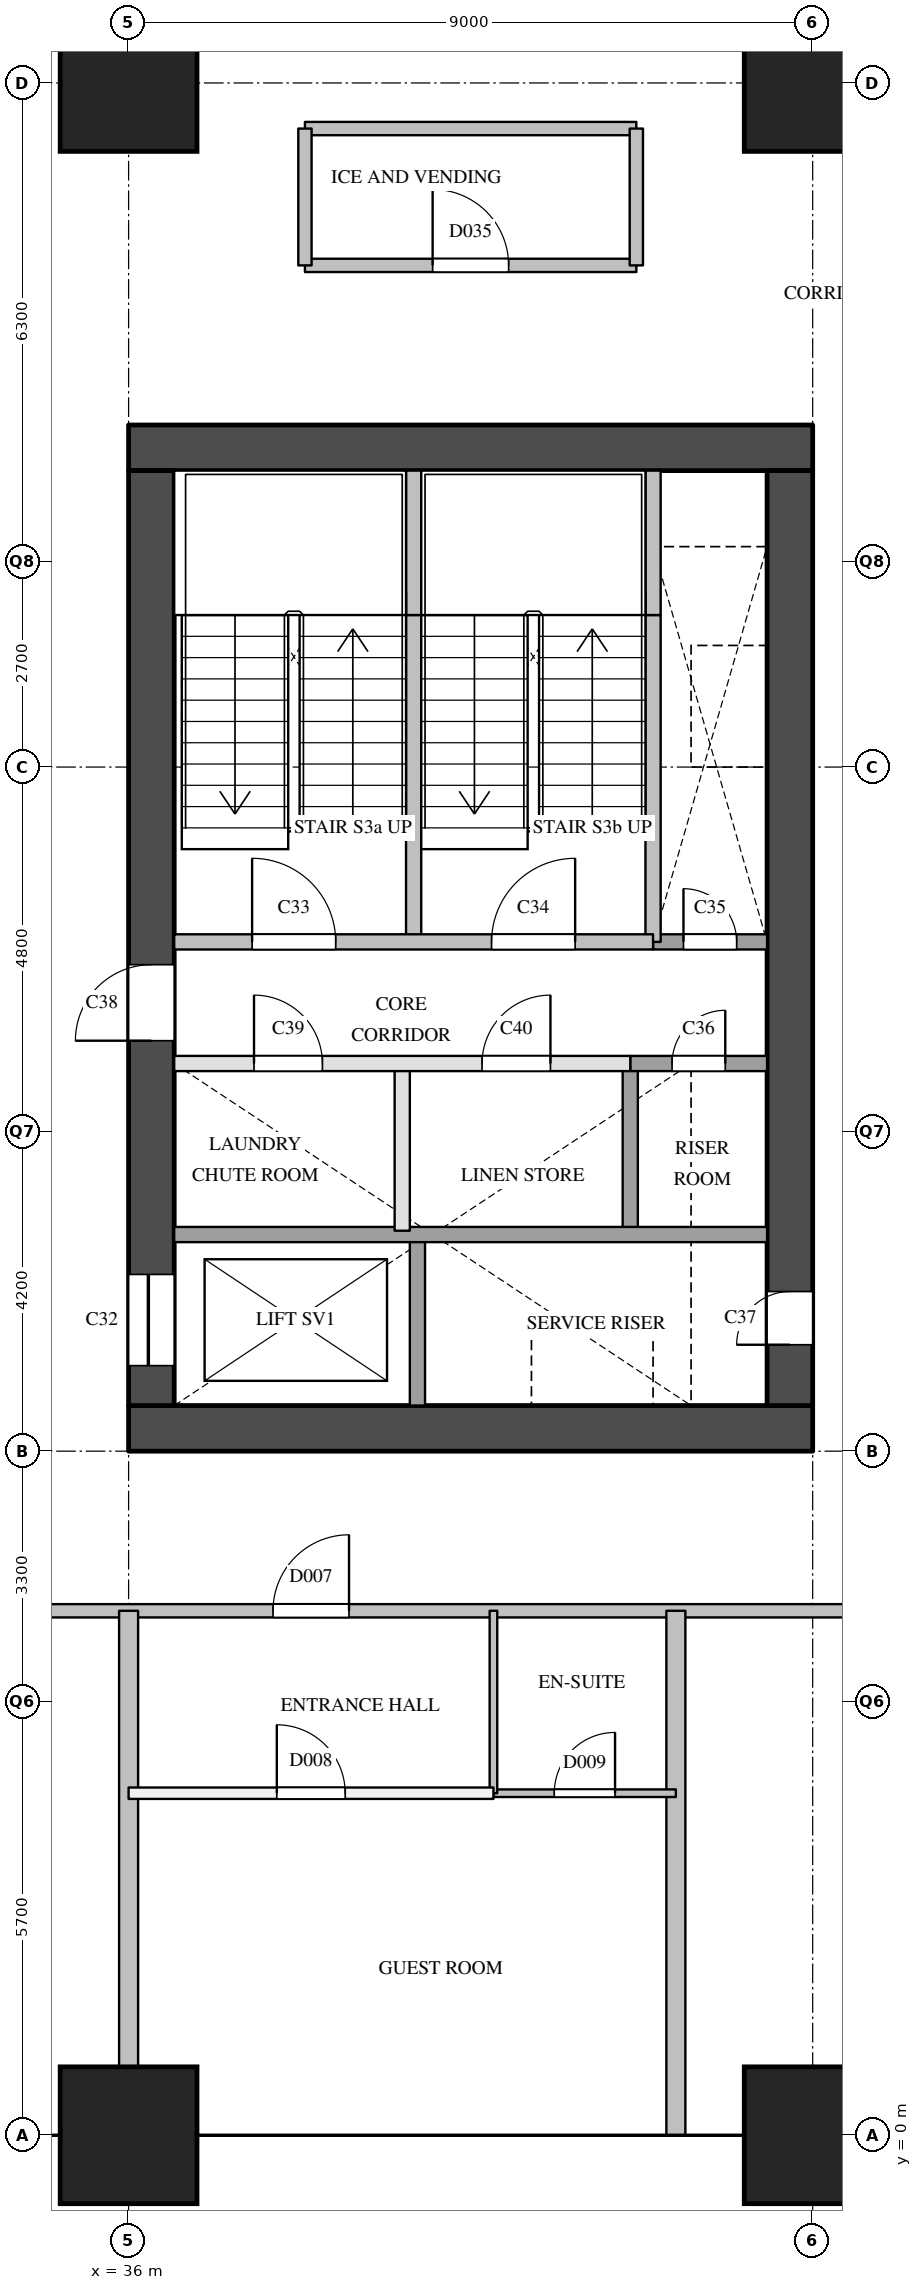
"""IFC4 building model, lengths in metres.
Left out: names, types, materials, properties, quantities, classifications, styles, units other than length and angle.
Written with IfcOpenShell. Run it as: python <this file> out.ifc"""

import sys

from ifc_helpers import new_model, si_unit, direction, frame, frame_2d, origin, origin_2d, place, context, subcontext, project, spatial, rectangle, extrude, element, fill, save


model = new_model("IFC4")
c1 = context("Model", 3, precision=1e-05, world=origin(), true_north=direction((0.0, 1.0)))
c2 = subcontext(c1, "Body", "Model", "MODEL_VIEW")
j1 = project(units=[si_unit("LENGTHUNIT", "METRE"), si_unit("PLANEANGLEUNIT", "RADIAN")], contexts=[c1])
p1 = place(None, origin())
s1 = spatial("IfcSite", under=j1, at=p1, CompositionType="ELEMENT")
p2 = place(p1, origin())
s2 = spatial("IfcBuilding", under=s1, at=p2, CompositionType="ELEMENT")
p3 = place(p2, frame((0.0, 0.0, 69.0)))
s3 = spatial("IfcBuildingStorey", under=s2, at=p3, CompositionType="ELEMENT", Elevation=69.0)
for number, where, z_axis, x_axis in (
    (1, (36.0, 0.0, 0.0), (0.0, 0.0, 1.0), (1.0, 0.0, 0.0)),
    (2, (36.0, 27.0, 0.0), (0.0, 0.0, 1.0), (1.0, 0.0, 0.0)),
    (3, (45.0, 0.0, 0.0), (0.0, 0.0, 1.0), (1.0, 0.0, 0.0)),
    (4, (45.0, 27.0, 0.0), (0.0, 0.0, 1.0), (1.0, 0.0, 0.0)),
):
    element("IfcColumn", number, at=place(p3, frame(where, z_axis=z_axis, x_axis=x_axis)), inside=s3, PredefinedType="COLUMN", context=c2, shape_type="SweptSolid", body=[
        extrude(rectangle(XDim=1.8, YDim=1.8, at=origin_2d()), origin(), (0.0, 0.0, 1.0), 3.8),
    ])
for number, where, z_axis, x_axis in (
    (5, (36.0, 9.3, 0.0), (0.0, 0.0, 1.0), (1.0, 0.0, 0.0)),
    (6, (36.0, 22.2, 0.0), (0.0, 0.0, 1.0), (1.0, 0.0, 0.0)),
):
    element("IfcWall", number, at=place(p3, frame(where, z_axis=z_axis, x_axis=x_axis)), inside=s3, PredefinedType="SHEAR", context=c2, shape_type="SweptSolid", body=[
        extrude(rectangle(XDim=9.0, YDim=0.6, at=frame_2d((4.5, 0.0))), origin(), (0.0, 0.0, 1.0), 3.5),
    ])
p4 = place(p3, frame((36.3, 9.6, 0.0), z_axis=(0.0, 0.0, 1.0), x_axis=(0.0, 1.0, 0.0)))
e7 = element("IfcWall", 7, at=p4, inside=s3, PredefinedType="SHEAR", context=c2, shape_type="SweptSolid", body=[
    extrude(rectangle(XDim=12.3, YDim=0.6, at=frame_2d((6.15, 0.0))), origin(), (0.0, 0.0, 1.0), 3.5),
])
p5 = place(p4, frame((0.525, 0.0, 0.0)))
e8 = element("IfcOpeningElement", 8, at=p5, cuts=e7, PredefinedType="OPENING", context=c2, shape_type="SweptSolid", body=[
    extrude(rectangle(XDim=1.2, YDim=2.1, at=frame_2d((0.6, 1.05))), frame((0.0, 0.31, 0.0), z_axis=(0.0, -1.0, 0.0), x_axis=(1.0, 0.0, 0.0)), (0.0, 0.0, 1.0), 0.62),
])
p6 = place(p4, frame((4.8, 0.0, 0.0)))
e9 = element("IfcOpeningElement", 9, at=p6, cuts=e7, PredefinedType="OPENING", context=c2, shape_type="SweptSolid", body=[
    extrude(rectangle(XDim=1.0, YDim=2.1, at=frame_2d((0.5, 1.05))), frame((0.0, 0.31, 0.0), z_axis=(0.0, -1.0, 0.0), x_axis=(1.0, 0.0, 0.0)), (0.0, 0.0, 1.0), 0.62),
])
p7 = place(p3, frame((44.7, 9.6, 0.0), z_axis=(0.0, 0.0, 1.0), x_axis=(0.0, 1.0, 0.0)))
e10 = element("IfcWall", 10, at=p7, inside=s3, PredefinedType="SHEAR", context=c2, shape_type="SweptSolid", body=[
    extrude(rectangle(XDim=12.3, YDim=0.6, at=frame_2d((6.15, 0.0))), origin(), (0.0, 0.0, 1.0), 3.5),
])
p8 = place(p7, frame((0.8, 0.0, 0.0)))
e11 = element("IfcOpeningElement", 11, at=p8, cuts=e10, PredefinedType="OPENING", context=c2, shape_type="SweptSolid", body=[
    extrude(rectangle(XDim=0.7, YDim=2.1, at=frame_2d((0.35, 1.05))), frame((0.0, 0.31, 0.0), z_axis=(0.0, -1.0, 0.0), x_axis=(1.0, 0.0, 0.0)), (0.0, 0.0, 1.0), 0.62),
])
p9 = place(p3, frame((39.6, 11.9, 0.0), z_axis=(0.0, 0.0, 1.0), x_axis=(0.0, 1.0, 0.0)))
e12 = element("IfcWall", 12, at=p9, inside=s3, PredefinedType="PARTITIONING", context=c2, shape_type="SweptSolid", body=[
    extrude(rectangle(XDim=2.2, YDim=0.2, at=frame_2d((1.1, 0.0))), origin(), (0.0, 0.0, 1.0), 3.5),
])
p10 = place(p3, frame((39.75, 15.7, 0.0), z_axis=(0.0, 0.0, 1.0), x_axis=(0.0, 1.0, 0.0)))
e13 = element("IfcWall", 13, at=p10, inside=s3, PredefinedType="SOLIDWALL", context=c2, shape_type="SweptSolid", body=[
    extrude(rectangle(XDim=4.3, YDim=0.2, at=frame_2d((2.15, 0.0))), origin(), (0.0, 0.0, 1.0), 3.5),
])
p11 = place(p3, frame((39.75, 20.0, 0.0), z_axis=(0.0, 0.0, 1.0), x_axis=(0.0, 1.0, 0.0)))
e14 = element("IfcWall", 14, at=p11, inside=s3, PredefinedType="SOLIDWALL", context=c2, shape_type="SweptSolid", body=[
    extrude(rectangle(XDim=1.9, YDim=0.2, at=frame_2d((0.95, 0.0))), origin(), (0.0, 0.0, 1.0), 3.5),
])
p12 = place(p3, frame((39.8, 9.6, 0.0), z_axis=(0.0, 0.0, 1.0), x_axis=(0.0, 1.0, 0.0)))
e15 = element("IfcWall", 15, at=p12, inside=s3, PredefinedType="SOLIDWALL", context=c2, shape_type="SweptSolid", body=[
    extrude(rectangle(XDim=2.3, YDim=0.2, at=frame_2d((1.15, 0.0))), origin(), (0.0, 0.0, 1.0), 3.5),
])
p13 = place(p3, frame((42.6, 11.9, 0.0), z_axis=(0.0, 0.0, 1.0), x_axis=(0.0, 1.0, 0.0)))
e16 = element("IfcWall", 16, at=p13, inside=s3, PredefinedType="SOLIDWALL", context=c2, shape_type="SweptSolid", body=[
    extrude(rectangle(XDim=2.2, YDim=0.2, at=frame_2d((1.1, 0.0))), origin(), (0.0, 0.0, 1.0), 3.5),
])
p14 = place(p3, frame((42.9, 15.7, 0.0), z_axis=(0.0, 0.0, 1.0), x_axis=(0.0, 1.0, 0.0)))
e17 = element("IfcWall", 17, at=p14, inside=s3, PredefinedType="SOLIDWALL", context=c2, shape_type="SweptSolid", body=[
    extrude(rectangle(XDim=4.3, YDim=0.2, at=frame_2d((2.15, 0.0))), origin(), (0.0, 0.0, 1.0), 3.5),
])
p15 = place(p3, frame((42.9, 20.0, 0.0), z_axis=(0.0, 0.0, 1.0), x_axis=(0.0, 1.0, 0.0)))
e18 = element("IfcWall", 18, at=p15, inside=s3, PredefinedType="SOLIDWALL", context=c2, shape_type="SweptSolid", body=[
    extrude(rectangle(XDim=1.9, YDim=0.2, at=frame_2d((0.95, 0.0))), origin(), (0.0, 0.0, 1.0), 3.5),
])
p16 = place(p3, frame((36.6, 11.85, 0.0), z_axis=(0.0, 0.0, 1.0), x_axis=(1.0, 0.0, 0.0)))
e19 = element("IfcWall", 19, at=p16, inside=s3, PredefinedType="SOLIDWALL", context=c2, shape_type="SweptSolid", body=[
    extrude(rectangle(XDim=7.8, YDim=0.2, at=frame_2d((3.9, 0.0))), origin(), (0.0, 0.0, 1.0), 3.5),
])
p17 = place(p3, frame((36.6, 14.1, 0.0), z_axis=(0.0, 0.0, 1.0), x_axis=(1.0, 0.0, 0.0)))
e20 = element("IfcWall", 20, at=p17, inside=s3, PredefinedType="PARTITIONING", context=c2, shape_type="SweptSolid", body=[
    extrude(rectangle(XDim=6.0, YDim=0.2, at=frame_2d((3.0, 0.0))), origin(), (0.0, 0.0, 1.0), 3.5),
])
p18 = place(p17, frame((1.05, 0.0, 0.0)))
e21 = element("IfcOpeningElement", 21, at=p18, cuts=e20, PredefinedType="OPENING", context=c2, shape_type="SweptSolid", body=[
    extrude(rectangle(XDim=0.9, YDim=2.1, at=frame_2d((0.45, 1.05))), frame((0.0, 0.11, 0.0), z_axis=(0.0, -1.0, 0.0), x_axis=(1.0, 0.0, 0.0)), (0.0, 0.0, 1.0), 0.22),
])
p19 = place(p17, frame((4.05, 0.0, 0.0)))
e22 = element("IfcOpeningElement", 22, at=p19, cuts=e20, PredefinedType="OPENING", context=c2, shape_type="SweptSolid", body=[
    extrude(rectangle(XDim=0.9, YDim=2.1, at=frame_2d((0.45, 1.05))), frame((0.0, 0.11, 0.0), z_axis=(0.0, -1.0, 0.0), x_axis=(1.0, 0.0, 0.0)), (0.0, 0.0, 1.0), 0.22),
])
p20 = place(p3, frame((42.6, 14.1, 0.0), z_axis=(0.0, 0.0, 1.0), x_axis=(1.0, 0.0, 0.0)))
e23 = element("IfcWall", 23, at=p20, inside=s3, PredefinedType="SOLIDWALL", context=c2, shape_type="SweptSolid", body=[
    extrude(rectangle(XDim=1.8, YDim=0.2, at=frame_2d((0.9, 0.0))), origin(), (0.0, 0.0, 1.0), 3.5),
])
p21 = place(p20, frame((0.55, 0.0, 0.0)))
e24 = element("IfcOpeningElement", 24, at=p21, cuts=e23, PredefinedType="OPENING", context=c2, shape_type="SweptSolid", body=[
    extrude(rectangle(XDim=0.7, YDim=2.1, at=frame_2d((0.35, 1.05))), frame((0.0, 0.11, 0.0), z_axis=(0.0, -1.0, 0.0), x_axis=(1.0, 0.0, 0.0)), (0.0, 0.0, 1.0), 0.22),
])
p22 = place(p3, frame((42.9, 15.7, 0.0), z_axis=(0.0, 0.0, 1.0), x_axis=(1.0, 0.0, 0.0)))
e25 = element("IfcWall", 25, at=p22, inside=s3, PredefinedType="SOLIDWALL", context=c2, shape_type="SweptSolid", body=[
    extrude(rectangle(XDim=1.5, YDim=0.2, at=frame_2d((0.75, 0.0))), origin(), (0.0, 0.0, 1.0), 3.5),
])
p23 = place(p22, frame((0.4, 0.0, 0.0)))
e26 = element("IfcOpeningElement", 26, at=p23, cuts=e25, PredefinedType="OPENING", context=c2, shape_type="SweptSolid", body=[
    extrude(rectangle(XDim=0.7, YDim=2.1, at=frame_2d((0.35, 1.05))), frame((0.0, 0.11, 0.0), z_axis=(0.0, -1.0, 0.0), x_axis=(1.0, 0.0, 0.0)), (0.0, 0.0, 1.0), 0.22),
])
p24 = place(p3, frame((36.6, 15.7, 0.0), z_axis=(0.0, 0.0, 1.0), x_axis=(1.0, 0.0, 0.0)))
e27 = element("IfcWall", 27, at=p24, inside=s3, PredefinedType="SOLIDWALL", context=c2, shape_type="SweptSolid", body=[
    extrude(rectangle(XDim=6.3, YDim=0.2, at=frame_2d((3.15, 0.0))), origin(), (0.0, 0.0, 1.0), 3.5),
])
p25 = place(p24, frame((1.025, 0.0, 0.0)))
e28 = element("IfcOpeningElement", 28, at=p25, cuts=e27, PredefinedType="OPENING", context=c2, shape_type="SweptSolid", body=[
    extrude(rectangle(XDim=1.1, YDim=2.1, at=frame_2d((0.55, 1.05))), frame((0.0, 0.11, 0.0), z_axis=(0.0, -1.0, 0.0), x_axis=(1.0, 0.0, 0.0)), (0.0, 0.0, 1.0), 0.22),
])
p26 = place(p24, frame((4.175, 0.0, 0.0)))
e29 = element("IfcOpeningElement", 29, at=p26, cuts=e27, PredefinedType="OPENING", context=c2, shape_type="SweptSolid", body=[
    extrude(rectangle(XDim=1.1, YDim=2.1, at=frame_2d((0.55, 1.05))), frame((0.0, 0.11, 0.0), z_axis=(0.0, -1.0, 0.0), x_axis=(1.0, 0.0, 0.0)), (0.0, 0.0, 1.0), 0.22),
])
p27 = place(p3, frame((33.9, 6.9, 0.0), z_axis=(0.0, 0.0, 1.0), x_axis=(1.0, 0.0, 0.0)))
e30 = element("IfcWall", 30, at=p27, inside=s3, PredefinedType="PARTITIONING", context=c2, shape_type="SweptSolid", body=[
    extrude(rectangle(XDim=13.2, YDim=0.175, at=frame_2d((6.6, 0.0))), origin(), (0.0, 0.0, 1.0), 3.5),
])
p28 = place(p27, frame((4.0, 0.0, 0.0)))
e31 = element("IfcOpeningElement", 31, at=p28, cuts=e30, PredefinedType="OPENING", context=c2, shape_type="SweptSolid", body=[
    extrude(rectangle(XDim=1.0, YDim=2.1, at=frame_2d((0.5, 1.05))), frame((0.0, 0.097, 0.0), z_axis=(0.0, -1.0, 0.0), x_axis=(1.0, 0.0, 0.0)), (0.0, 0.0, 1.0), 0.195),
])
p29 = place(p3, frame((38.32, 24.6, 0.0), z_axis=(0.0, 0.0, 1.0), x_axis=(1.0, 0.0, 0.0)))
e32 = element("IfcWall", 32, at=p29, inside=s3, PredefinedType="PARTITIONING", context=c2, shape_type="SweptSolid", body=[
    extrude(rectangle(XDim=4.36, YDim=0.175, at=frame_2d((2.18, 0.0))), origin(), (0.0, 0.0, 1.0), 3.5),
])
p30 = place(p29, frame((1.68, 0.0, 0.0)))
e33 = element("IfcOpeningElement", 33, at=p30, cuts=e32, PredefinedType="OPENING", context=c2, shape_type="SweptSolid", body=[
    extrude(rectangle(XDim=1.0, YDim=2.1, at=frame_2d((0.5, 1.05))), frame((0.0, 0.097, 0.0), z_axis=(0.0, -1.0, 0.0), x_axis=(1.0, 0.0, 0.0)), (0.0, 0.0, 1.0), 0.195),
])
p31 = place(p3, frame((38.32, 26.4, 0.0), z_axis=(0.0, 0.0, 1.0), x_axis=(1.0, 0.0, 0.0)))
e34 = element("IfcWall", 34, at=p31, inside=s3, PredefinedType="PARTITIONING", context=c2, shape_type="SweptSolid", body=[
    extrude(rectangle(XDim=4.36, YDim=0.175, at=frame_2d((2.18, 0.0))), origin(), (0.0, 0.0, 1.0), 3.5),
])
for number, where, z_axis, x_axis in (
    (35, (38.32, 24.6, 0.0), (0.0, 0.0, 1.0), (0.0, 1.0, 0.0)),
    (36, (42.68, 24.6, 0.0), (0.0, 0.0, 1.0), (0.0, 1.0, 0.0)),
):
    element("IfcWall", number, at=place(p3, frame(where, z_axis=z_axis, x_axis=x_axis)), inside=s3, PredefinedType="PARTITIONING", context=c2, shape_type="SweptSolid", body=[
        extrude(rectangle(XDim=1.8, YDim=0.175, at=frame_2d((0.9, 0.0))), origin(), (0.0, 0.0, 1.0), 3.5),
    ])
p32 = place(p3, frame((36.0, 4.5, 0.0), z_axis=(0.0, 0.0, 1.0), x_axis=(1.0, 0.0, 0.0)))
e37 = element("IfcWall", 37, at=p32, inside=s3, PredefinedType="PARTITIONING", context=c2, shape_type="SweptSolid", body=[
    extrude(rectangle(XDim=4.8, YDim=0.15, at=frame_2d((2.4, 0.0))), origin(), (0.0, 0.0, 1.0), 3.5),
])
p33 = place(p32, frame((1.95, 0.0, 0.0)))
e38 = element("IfcOpeningElement", 38, at=p33, cuts=e37, PredefinedType="OPENING", context=c2, shape_type="SweptSolid", body=[
    extrude(rectangle(XDim=0.9, YDim=2.1, at=frame_2d((0.45, 1.05))), frame((0.0, 0.085, 0.0), z_axis=(0.0, -1.0, 0.0), x_axis=(1.0, 0.0, 0.0)), (0.0, 0.0, 1.0), 0.17),
])
p34 = place(p3, frame((36.0, 0.0, 0.0), z_axis=(0.0, 0.0, 1.0), x_axis=(0.0, 1.0, 0.0)))
e39 = element("IfcWall", 39, at=p34, inside=s3, PredefinedType="PARTITIONING", context=c2, shape_type="SweptSolid", body=[
    extrude(rectangle(XDim=6.9, YDim=0.25, at=frame_2d((3.45, 0.0))), origin(), (0.0, 0.0, 1.0), 3.5),
])
p35 = place(p3, frame((43.2, 0.0, 0.0), z_axis=(0.0, 0.0, 1.0), x_axis=(0.0, 1.0, 0.0)))
e40 = element("IfcWall", 40, at=p35, inside=s3, PredefinedType="PARTITIONING", context=c2, shape_type="SweptSolid", body=[
    extrude(rectangle(XDim=6.9, YDim=0.25, at=frame_2d((3.45, 0.0))), origin(), (0.0, 0.0, 1.0), 2.5),
])
p36 = place(p3, frame((40.8, 4.5, 0.0), z_axis=(0.0, 0.0, 1.0), x_axis=(1.0, 0.0, 0.0)))
e41 = element("IfcWall", 41, at=p36, inside=s3, PredefinedType="PARTITIONING", context=c2, shape_type="SweptSolid", body=[
    extrude(rectangle(XDim=2.4, YDim=0.1, at=frame_2d((1.2, 0.0))), origin(), (0.0, 0.0, 1.0), 3.5),
])
p37 = place(p36, frame((0.8, 0.0, 0.0)))
e42 = element("IfcOpeningElement", 42, at=p37, cuts=e41, PredefinedType="OPENING", context=c2, shape_type="SweptSolid", body=[
    extrude(rectangle(XDim=0.8, YDim=2.1, at=frame_2d((0.4, 1.05))), frame((0.0, 0.06, 0.0), z_axis=(0.0, -1.0, 0.0), x_axis=(1.0, 0.0, 0.0)), (0.0, 0.0, 1.0), 0.12),
])
p38 = place(p3, frame((40.8, 4.5, 0.0), z_axis=(0.0, 0.0, 1.0), x_axis=(0.0, 1.0, 0.0)))
e43 = element("IfcWall", 43, at=p38, inside=s3, PredefinedType="PARTITIONING", context=c2, shape_type="SweptSolid", body=[
    extrude(rectangle(XDim=2.4, YDim=0.1, at=frame_2d((1.2, 0.0))), origin(), (0.0, 0.0, 1.0), 3.5),
])
p39 = place(p5, origin())
e44 = element("IfcDoor", 44, at=p39, inside=s3, OperationType="SLIDING_TO_LEFT", PredefinedType="DOOR", context=c2, shape_type="SweptSolid", body=[
    extrude(rectangle(XDim=1.2, YDim=2.1, at=frame_2d((0.6, 1.05))), frame((0.0, 0.025, 0.0), z_axis=(0.0, -1.0, 0.0), x_axis=(1.0, 0.0, 0.0)), (0.0, 0.0, 1.0), 0.05),
])
fill(e8, e44)
p40 = place(p25, origin())
e45 = element("IfcDoor", 45, at=p40, inside=s3, OperationType="SINGLE_SWING_LEFT", PredefinedType="DOOR", context=c2, shape_type="SweptSolid", body=[
    extrude(rectangle(XDim=1.1, YDim=2.1, at=frame_2d((0.55, 1.05))), frame((0.0, 0.025, 0.0), z_axis=(0.0, -1.0, 0.0), x_axis=(1.0, 0.0, 0.0)), (0.0, 0.0, 1.0), 0.05),
])
fill(e28, e45)
p41 = place(p26, origin())
e46 = element("IfcDoor", 46, at=p41, inside=s3, OperationType="SINGLE_SWING_RIGHT", PredefinedType="DOOR", context=c2, shape_type="SweptSolid", body=[
    extrude(rectangle(XDim=1.1, YDim=2.1, at=frame_2d((0.55, 1.05))), frame((0.0, 0.025, 0.0), z_axis=(0.0, -1.0, 0.0), x_axis=(1.0, 0.0, 0.0)), (0.0, 0.0, 1.0), 0.05),
])
fill(e29, e46)
p42 = place(p23, origin())
e47 = element("IfcDoor", 47, at=p42, inside=s3, OperationType="SINGLE_SWING_LEFT", PredefinedType="DOOR", context=c2, shape_type="SweptSolid", body=[
    extrude(rectangle(XDim=0.7, YDim=2.1, at=frame_2d((0.35, 1.05))), frame((0.0, 0.025, 0.0), z_axis=(0.0, -1.0, 0.0), x_axis=(1.0, 0.0, 0.0)), (0.0, 0.0, 1.0), 0.05),
])
fill(e26, e47)
p43 = place(p21, origin())
e48 = element("IfcDoor", 48, at=p43, inside=s3, OperationType="SINGLE_SWING_RIGHT", PredefinedType="DOOR", context=c2, shape_type="SweptSolid", body=[
    extrude(rectangle(XDim=0.7, YDim=2.1, at=frame_2d((0.35, 1.05))), frame((0.0, 0.025, 0.0), z_axis=(0.0, -1.0, 0.0), x_axis=(1.0, 0.0, 0.0)), (0.0, 0.0, 1.0), 0.05),
])
fill(e24, e48)
p44 = place(p8, origin())
e49 = element("IfcDoor", 49, at=p44, inside=s3, OperationType="SINGLE_SWING_LEFT", PredefinedType="DOOR", context=c2, shape_type="SweptSolid", body=[
    extrude(rectangle(XDim=0.7, YDim=2.1, at=frame_2d((0.35, 1.05))), frame((0.0, 0.025, 0.0), z_axis=(0.0, -1.0, 0.0), x_axis=(1.0, 0.0, 0.0)), (0.0, 0.0, 1.0), 0.05),
])
fill(e11, e49)
p45 = place(p6, origin())
e50 = element("IfcDoor", 50, at=p45, inside=s3, OperationType="SINGLE_SWING_LEFT", PredefinedType="DOOR", context=c2, shape_type="SweptSolid", body=[
    extrude(rectangle(XDim=1.0, YDim=2.1, at=frame_2d((0.5, 1.05))), frame((0.0, 0.025, 0.0), z_axis=(0.0, -1.0, 0.0), x_axis=(1.0, 0.0, 0.0)), (0.0, 0.0, 1.0), 0.05),
])
fill(e9, e50)
p46 = place(p18, origin())
e51 = element("IfcDoor", 51, at=p46, inside=s3, OperationType="SINGLE_SWING_LEFT", PredefinedType="DOOR", context=c2, shape_type="SweptSolid", body=[
    extrude(rectangle(XDim=0.9, YDim=2.1, at=frame_2d((0.45, 1.05))), frame((0.0, 0.025, 0.0), z_axis=(0.0, -1.0, 0.0), x_axis=(1.0, 0.0, 0.0)), (0.0, 0.0, 1.0), 0.05),
])
fill(e21, e51)
p47 = place(p19, origin())
e52 = element("IfcDoor", 52, at=p47, inside=s3, OperationType="SINGLE_SWING_RIGHT", PredefinedType="DOOR", context=c2, shape_type="SweptSolid", body=[
    extrude(rectangle(XDim=0.9, YDim=2.1, at=frame_2d((0.45, 1.05))), frame((0.0, 0.025, 0.0), z_axis=(0.0, -1.0, 0.0), x_axis=(1.0, 0.0, 0.0)), (0.0, 0.0, 1.0), 0.05),
])
fill(e22, e52)
p48 = place(p28, origin())
e53 = element("IfcDoor", 53, at=p48, inside=s3, OperationType="SINGLE_SWING_RIGHT", PredefinedType="DOOR", context=c2, shape_type="SweptSolid", body=[
    extrude(rectangle(XDim=1.0, YDim=2.1, at=frame_2d((0.5, 1.05))), frame((0.0, 0.025, 0.0), z_axis=(0.0, -1.0, 0.0), x_axis=(1.0, 0.0, 0.0)), (0.0, 0.0, 1.0), 0.05),
])
fill(e31, e53)
p49 = place(p33, origin())
e54 = element("IfcDoor", 54, at=p49, inside=s3, OperationType="SINGLE_SWING_LEFT", PredefinedType="DOOR", context=c2, shape_type="SweptSolid", body=[
    extrude(rectangle(XDim=0.9, YDim=2.1, at=frame_2d((0.45, 1.05))), frame((0.0, 0.025, 0.0), z_axis=(0.0, -1.0, 0.0), x_axis=(1.0, 0.0, 0.0)), (0.0, 0.0, 1.0), 0.05),
])
fill(e38, e54)
p50 = place(p37, origin())
e55 = element("IfcDoor", 55, at=p50, inside=s3, OperationType="SINGLE_SWING_RIGHT", PredefinedType="DOOR", context=c2, shape_type="SweptSolid", body=[
    extrude(rectangle(XDim=0.8, YDim=2.1, at=frame_2d((0.4, 1.05))), frame((0.0, 0.025, 0.0), z_axis=(0.0, -1.0, 0.0), x_axis=(1.0, 0.0, 0.0)), (0.0, 0.0, 1.0), 0.05),
])
fill(e42, e55)
p51 = place(p30, origin())
e56 = element("IfcDoor", 56, at=p51, inside=s3, OperationType="SINGLE_SWING_LEFT", PredefinedType="DOOR", context=c2, shape_type="SweptSolid", body=[
    extrude(rectangle(XDim=1.0, YDim=2.1, at=frame_2d((0.5, 1.05))), frame((0.0, 0.025, 0.0), z_axis=(0.0, -1.0, 0.0), x_axis=(1.0, 0.0, 0.0)), (0.0, 0.0, 1.0), 0.05),
])
fill(e33, e56)
save(model, sys.argv[1])
